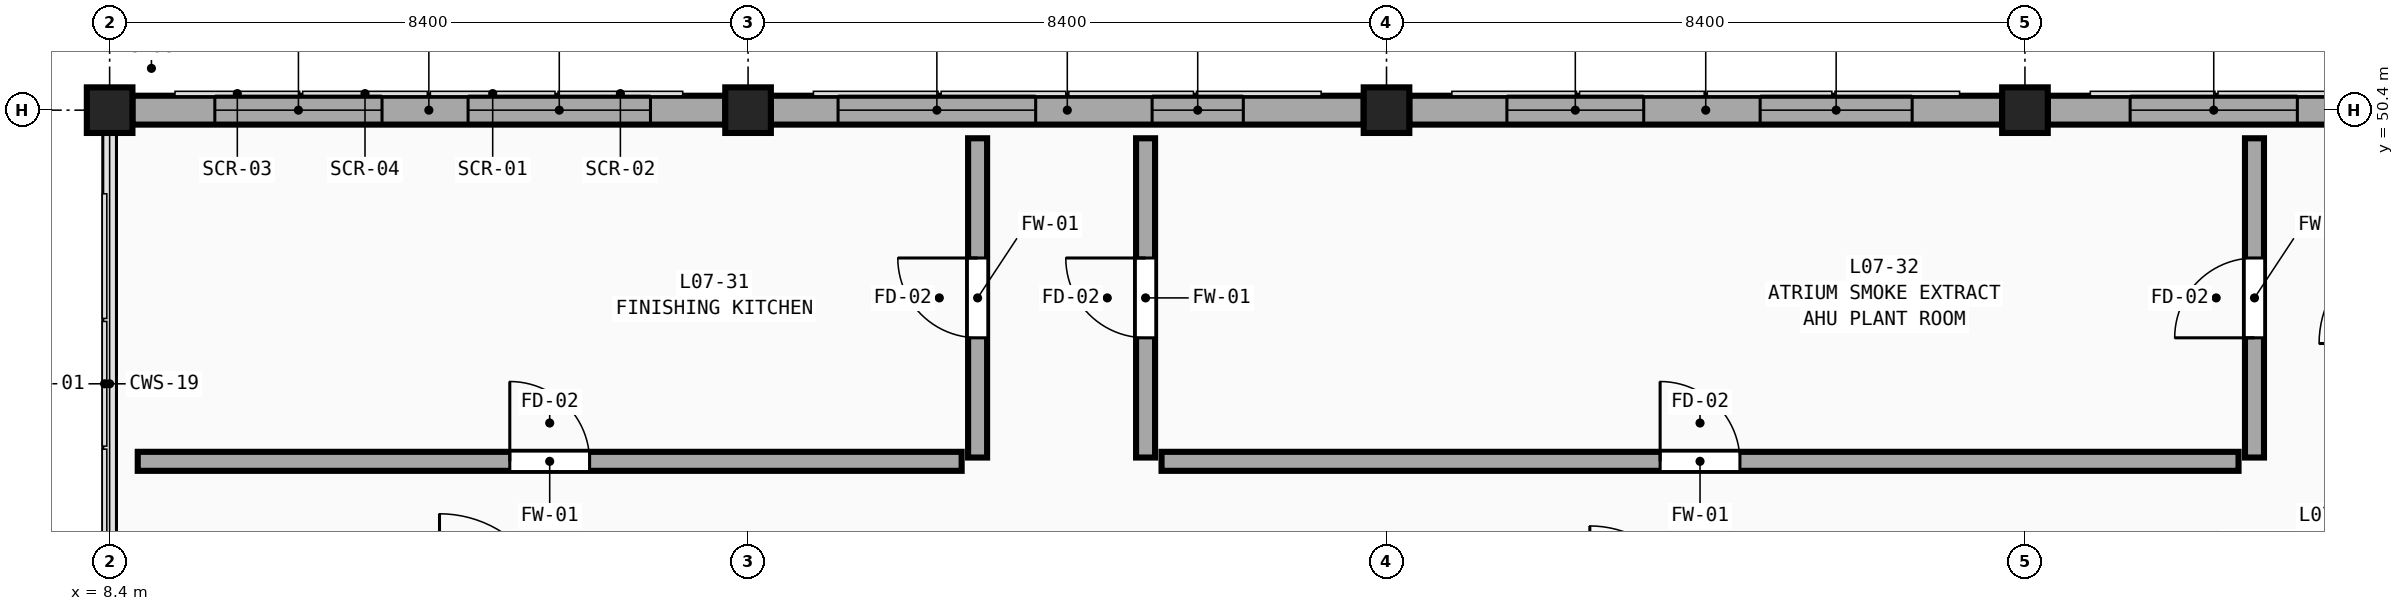
"""IFC4 building model, lengths in metres.
Left out: names, types, materials, properties, quantities, classifications, styles, units other than length and angle.
Written with IfcOpenShell. Run it as: python <this file> out.ifc"""

import sys

from ifc_helpers import new_model, si_unit, direction, frame, frame_2d, origin, origin_2d, place, context, subcontext, project, spatial, rectangle, extrude, element, fill, save


model = new_model("IFC4")
c1 = context("Model", 3, precision=1e-05, world=origin(), true_north=direction((0.0, 1.0)))
c2 = subcontext(c1, "Body", "Model", "MODEL_VIEW")
j1 = project(units=[si_unit("LENGTHUNIT", "METRE"), si_unit("PLANEANGLEUNIT", "RADIAN")], contexts=[c1])
p1 = place(None, origin())
s1 = spatial("IfcSite", under=j1, at=p1, CompositionType="ELEMENT")
p2 = place(p1, origin())
s2 = spatial("IfcBuilding", under=s1, at=p2, CompositionType="ELEMENT")
p3 = place(p2, frame((0.0, 0.0, 32.1)))
s3 = spatial("IfcBuildingStorey", under=s2, at=p3, CompositionType="ELEMENT", Elevation=32.1)
for number, where, z_axis, x_axis in (
    (1, (8.4, 50.4, 0.0), (0.0, 0.0, 1.0), (1.0, 0.0, 0.0)),
    (2, (16.8, 50.4, 0.0), (0.0, 0.0, 1.0), (1.0, 0.0, 0.0)),
    (3, (25.2, 50.4, 0.0), (0.0, 0.0, 1.0), (1.0, 0.0, 0.0)),
    (4, (33.6, 50.4, 0.0), (0.0, 0.0, 1.0), (1.0, 0.0, 0.0)),
):
    element("IfcColumn", number, at=place(p3, frame(where, z_axis=z_axis, x_axis=x_axis)), inside=s3, PredefinedType="COLUMN", context=c2, shape_type="SweptSolid", body=[
        extrude(rectangle(XDim=0.6, YDim=0.6, at=origin_2d()), origin(), (0.0, 0.0, 1.0), 4.5),
    ])
p4 = place(p3, frame((8.7, 50.4, 0.0), z_axis=(0.0, 0.0, 1.0), x_axis=(1.0, 0.0, 0.0)))
e5 = element("IfcWall", 5, at=p4, inside=s3, PredefinedType="SOLIDWALL", context=c2, shape_type="SweptSolid", body=[
    extrude(rectangle(XDim=7.8, YDim=0.38, at=frame_2d((3.9, 0.0))), origin(), (0.0, 0.0, 1.0), 3.69),
])
p5 = place(p4, frame((1.084, 0.0, 0.75)))
e6 = element("IfcOpeningElement", 6, at=p5, cuts=e5, PredefinedType="OPENING", context=c2, shape_type="SweptSolid", body=[
    extrude(rectangle(XDim=2.2, YDim=1.9, at=frame_2d((1.1, 0.95))), frame((0.0, 0.21, 0.0), z_axis=(0.0, -1.0, 0.0), x_axis=(1.0, 0.0, 0.0)), (0.0, 0.0, 1.0), 0.42),
])
p6 = place(p4, frame((4.416, 0.0, 0.75)))
e7 = element("IfcOpeningElement", 7, at=p6, cuts=e5, PredefinedType="OPENING", context=c2, shape_type="SweptSolid", body=[
    extrude(rectangle(XDim=2.4, YDim=1.9, at=frame_2d((1.2, 0.95))), frame((0.0, 0.21, 0.0), z_axis=(0.0, -1.0, 0.0), x_axis=(1.0, 0.0, 0.0)), (0.0, 0.0, 1.0), 0.42),
])
p7 = place(p3, frame((17.1, 50.4, 0.0), z_axis=(0.0, 0.0, 1.0), x_axis=(1.0, 0.0, 0.0)))
e8 = element("IfcWall", 8, at=p7, inside=s3, PredefinedType="SOLIDWALL", context=c2, shape_type="SweptSolid", body=[
    extrude(rectangle(XDim=7.8, YDim=0.38, at=frame_2d((3.9, 0.0))), origin(), (0.0, 0.0, 1.0), 3.69),
])
p8 = place(p7, frame((0.884, 0.0, 0.75)))
e9 = element("IfcOpeningElement", 9, at=p8, cuts=e8, PredefinedType="OPENING", context=c2, shape_type="SweptSolid", body=[
    extrude(rectangle(XDim=2.6, YDim=1.9, at=frame_2d((1.3, 0.95))), frame((0.0, 0.21, 0.0), z_axis=(0.0, -1.0, 0.0), x_axis=(1.0, 0.0, 0.0)), (0.0, 0.0, 1.0), 0.42),
])
p9 = place(p7, frame((5.016, 0.0, 0.75)))
e10 = element("IfcOpeningElement", 10, at=p9, cuts=e8, PredefinedType="OPENING", context=c2, shape_type="SweptSolid", body=[
    extrude(rectangle(XDim=1.2, YDim=2.08, at=frame_2d((0.6, 1.04))), frame((0.0, 0.21, 0.0), z_axis=(0.0, -1.0, 0.0), x_axis=(1.0, 0.0, 0.0)), (0.0, 0.0, 1.0), 0.42),
])
p10 = place(p3, frame((25.5, 50.4, 0.0), z_axis=(0.0, 0.0, 1.0), x_axis=(1.0, 0.0, 0.0)))
e11 = element("IfcWall", 11, at=p10, inside=s3, PredefinedType="SOLIDWALL", context=c2, shape_type="SweptSolid", body=[
    extrude(rectangle(XDim=7.8, YDim=0.38, at=frame_2d((3.9, 0.0))), origin(), (0.0, 0.0, 1.0), 3.69),
])
p11 = place(p10, frame((1.284, 0.0, 0.75)))
e12 = element("IfcOpeningElement", 12, at=p11, cuts=e11, PredefinedType="OPENING", context=c2, shape_type="SweptSolid", body=[
    extrude(rectangle(XDim=1.8, YDim=2.08, at=frame_2d((0.9, 1.04))), frame((0.0, 0.21, 0.0), z_axis=(0.0, -1.0, 0.0), x_axis=(1.0, 0.0, 0.0)), (0.0, 0.0, 1.0), 0.42),
])
p12 = place(p10, frame((4.616, 0.0, 0.75)))
e13 = element("IfcOpeningElement", 13, at=p12, cuts=e11, PredefinedType="OPENING", context=c2, shape_type="SweptSolid", body=[
    extrude(rectangle(XDim=2.0, YDim=2.08, at=frame_2d((1.0, 1.04))), frame((0.0, 0.21, 0.0), z_axis=(0.0, -1.0, 0.0), x_axis=(1.0, 0.0, 0.0)), (0.0, 0.0, 1.0), 0.42),
])
p13 = place(p3, frame((33.9, 50.4, 0.0), z_axis=(0.0, 0.0, 1.0), x_axis=(1.0, 0.0, 0.0)))
e14 = element("IfcWall", 14, at=p13, inside=s3, PredefinedType="SOLIDWALL", context=c2, shape_type="SweptSolid", body=[
    extrude(rectangle(XDim=7.8, YDim=0.38, at=frame_2d((3.9, 0.0))), origin(), (0.0, 0.0, 1.0), 3.69),
])
p14 = place(p13, frame((1.084, 0.0, 0.75)))
e15 = element("IfcOpeningElement", 15, at=p14, cuts=e14, PredefinedType="OPENING", context=c2, shape_type="SweptSolid", body=[
    extrude(rectangle(XDim=2.2, YDim=2.08, at=frame_2d((1.1, 1.04))), frame((0.0, 0.21, 0.0), z_axis=(0.0, -1.0, 0.0), x_axis=(1.0, 0.0, 0.0)), (0.0, 0.0, 1.0), 0.42),
])
p15 = place(p13, frame((4.416, 0.0, 0.75)))
e16 = element("IfcOpeningElement", 16, at=p15, cuts=e14, PredefinedType="OPENING", context=c2, shape_type="SweptSolid", body=[
    extrude(rectangle(XDim=2.4, YDim=2.08, at=frame_2d((1.2, 1.04))), frame((0.0, 0.21, 0.0), z_axis=(0.0, -1.0, 0.0), x_axis=(1.0, 0.0, 0.0)), (0.0, 0.0, 1.0), 0.42),
])
p16 = place(p3, frame((22.24, 45.78, 0.0), z_axis=(0.0, 0.0, 1.0), x_axis=(1.0, 0.0, 0.0)))
e17 = element("IfcWall", 17, at=p16, inside=s3, PredefinedType="SOLIDWALL", context=c2, shape_type="SweptSolid", body=[
    extrude(rectangle(XDim=14.17, YDim=0.25, at=frame_2d((7.085, 0.0))), origin(), (0.0, 0.0, 1.0), 4.24),
])
p17 = place(p16, frame((6.56, 0.0, 0.0)))
e18 = element("IfcOpeningElement", 18, at=p17, cuts=e17, PredefinedType="OPENING", context=c2, shape_type="SweptSolid", body=[
    extrude(rectangle(XDim=1.05, YDim=2.15, at=frame_2d((0.525, 1.075))), frame((0.0, 0.145, 0.0), z_axis=(0.0, -1.0, 0.0), x_axis=(1.0, 0.0, 0.0)), (0.0, 0.0, 1.0), 0.29),
])
p18 = place(p3, frame((8.77, 45.78, 0.0), z_axis=(0.0, 0.0, 1.0), x_axis=(1.0, 0.0, 0.0)))
e19 = element("IfcWall", 19, at=p18, inside=s3, PredefinedType="SOLIDWALL", context=c2, shape_type="SweptSolid", body=[
    extrude(rectangle(XDim=10.84, YDim=0.25, at=frame_2d((5.42, 0.0))), origin(), (0.0, 0.0, 1.0), 4.24),
])
p19 = place(p18, frame((4.895, 0.0, 0.0)))
e20 = element("IfcOpeningElement", 20, at=p19, cuts=e19, PredefinedType="OPENING", context=c2, shape_type="SweptSolid", body=[
    extrude(rectangle(XDim=1.05, YDim=2.15, at=frame_2d((0.525, 1.075))), frame((0.0, 0.145, 0.0), z_axis=(0.0, -1.0, 0.0), x_axis=(1.0, 0.0, 0.0)), (0.0, 0.0, 1.0), 0.29),
])
p20 = place(p3, frame((19.82, 45.83, 0.0), z_axis=(0.0, 0.0, 1.0), x_axis=(0.0, 1.0, 0.0)))
e21 = element("IfcWall", 21, at=p20, inside=s3, PredefinedType="SOLIDWALL", context=c2, shape_type="SweptSolid", body=[
    extrude(rectangle(XDim=4.2, YDim=0.25, at=frame_2d((2.1, 0.0))), origin(), (0.0, 0.0, 1.0), 4.24),
])
p21 = place(p20, frame((1.575, 0.0, 0.0)))
e22 = element("IfcOpeningElement", 22, at=p21, cuts=e21, PredefinedType="OPENING", context=c2, shape_type="SweptSolid", body=[
    extrude(rectangle(XDim=1.05, YDim=2.15, at=frame_2d((0.525, 1.075))), frame((0.0, 0.145, 0.0), z_axis=(0.0, -1.0, 0.0), x_axis=(1.0, 0.0, 0.0)), (0.0, 0.0, 1.0), 0.29),
])
p22 = place(p3, frame((36.62, 45.83, 0.0), z_axis=(0.0, 0.0, 1.0), x_axis=(0.0, 1.0, 0.0)))
e23 = element("IfcWall", 23, at=p22, inside=s3, PredefinedType="SOLIDWALL", context=c2, shape_type="SweptSolid", body=[
    extrude(rectangle(XDim=4.2, YDim=0.25, at=frame_2d((2.1, 0.0))), origin(), (0.0, 0.0, 1.0), 4.24),
])
p23 = place(p22, frame((1.575, 0.0, 0.0)))
e24 = element("IfcOpeningElement", 24, at=p23, cuts=e23, PredefinedType="OPENING", context=c2, shape_type="SweptSolid", body=[
    extrude(rectangle(XDim=1.05, YDim=2.15, at=frame_2d((0.525, 1.075))), frame((0.0, 0.145, 0.0), z_axis=(0.0, -1.0, 0.0), x_axis=(1.0, 0.0, 0.0)), (0.0, 0.0, 1.0), 0.29),
])
p24 = place(p3, frame((22.03, 45.83, 0.0), z_axis=(0.0, 0.0, 1.0), x_axis=(0.0, 1.0, 0.0)))
e25 = element("IfcWall", 25, at=p24, inside=s3, PredefinedType="SOLIDWALL", context=c2, shape_type="SweptSolid", body=[
    extrude(rectangle(XDim=4.2, YDim=0.25, at=frame_2d((2.1, 0.0))), origin(), (0.0, 0.0, 1.0), 4.24),
])
p25 = place(p24, frame((1.575, 0.0, 0.0)))
e26 = element("IfcOpeningElement", 26, at=p25, cuts=e25, PredefinedType="OPENING", context=c2, shape_type="SweptSolid", body=[
    extrude(rectangle(XDim=1.05, YDim=2.15, at=frame_2d((0.525, 1.075))), frame((0.0, 0.145, 0.0), z_axis=(0.0, -1.0, 0.0), x_axis=(1.0, 0.0, 0.0)), (0.0, 0.0, 1.0), 0.29),
])
p26 = place(p5, origin())
e27 = element("IfcWindow", 27, at=p26, inside=s3, PartitioningType="TRIPLE_PANEL_VERTICAL", PredefinedType="WINDOW", context=c2, shape_type="SweptSolid", body=[
    extrude(rectangle(XDim=2.2, YDim=1.9, at=frame_2d((1.1, 0.95))), frame((0.0, 0.03, 0.0), z_axis=(0.0, -1.0, 0.0), x_axis=(1.0, 0.0, 0.0)), (0.0, 0.0, 1.0), 0.06),
])
fill(e6, e27)
p27 = place(p6, origin())
e28 = element("IfcWindow", 28, at=p27, inside=s3, PartitioningType="TRIPLE_PANEL_VERTICAL", PredefinedType="WINDOW", context=c2, shape_type="SweptSolid", body=[
    extrude(rectangle(XDim=2.4, YDim=1.9, at=frame_2d((1.2, 0.95))), frame((0.0, 0.03, 0.0), z_axis=(0.0, -1.0, 0.0), x_axis=(1.0, 0.0, 0.0)), (0.0, 0.0, 1.0), 0.06),
])
fill(e7, e28)
p28 = place(p8, origin())
e29 = element("IfcWindow", 29, at=p28, inside=s3, PartitioningType="TRIPLE_PANEL_VERTICAL", PredefinedType="WINDOW", context=c2, shape_type="SweptSolid", body=[
    extrude(rectangle(XDim=2.6, YDim=1.9, at=frame_2d((1.3, 0.95))), frame((0.0, 0.03, 0.0), z_axis=(0.0, -1.0, 0.0), x_axis=(1.0, 0.0, 0.0)), (0.0, 0.0, 1.0), 0.06),
])
fill(e9, e29)
p29 = place(p9, origin())
e30 = element("IfcWindow", 30, at=p29, inside=s3, PartitioningType="SINGLE_PANEL", PredefinedType="WINDOW", context=c2, shape_type="SweptSolid", body=[
    extrude(rectangle(XDim=1.2, YDim=2.08, at=frame_2d((0.6, 1.04))), frame((0.0, 0.03, 0.0), z_axis=(0.0, -1.0, 0.0), x_axis=(1.0, 0.0, 0.0)), (0.0, 0.0, 1.0), 0.06),
])
fill(e10, e30)
p30 = place(p11, origin())
e31 = element("IfcWindow", 31, at=p30, inside=s3, PartitioningType="DOUBLE_PANEL_VERTICAL", PredefinedType="WINDOW", context=c2, shape_type="SweptSolid", body=[
    extrude(rectangle(XDim=1.8, YDim=2.08, at=frame_2d((0.9, 1.04))), frame((0.0, 0.03, 0.0), z_axis=(0.0, -1.0, 0.0), x_axis=(1.0, 0.0, 0.0)), (0.0, 0.0, 1.0), 0.06),
])
fill(e12, e31)
p31 = place(p12, origin())
e32 = element("IfcWindow", 32, at=p31, inside=s3, PartitioningType="TRIPLE_PANEL_VERTICAL", PredefinedType="WINDOW", context=c2, shape_type="SweptSolid", body=[
    extrude(rectangle(XDim=2.0, YDim=2.08, at=frame_2d((1.0, 1.04))), frame((0.0, 0.03, 0.0), z_axis=(0.0, -1.0, 0.0), x_axis=(1.0, 0.0, 0.0)), (0.0, 0.0, 1.0), 0.06),
])
fill(e13, e32)
p32 = place(p14, origin())
e33 = element("IfcWindow", 33, at=p32, inside=s3, PartitioningType="TRIPLE_PANEL_VERTICAL", PredefinedType="WINDOW", context=c2, shape_type="SweptSolid", body=[
    extrude(rectangle(XDim=2.2, YDim=2.08, at=frame_2d((1.1, 1.04))), frame((0.0, 0.03, 0.0), z_axis=(0.0, -1.0, 0.0), x_axis=(1.0, 0.0, 0.0)), (0.0, 0.0, 1.0), 0.06),
])
fill(e15, e33)
p33 = place(p17, origin())
e34 = element("IfcDoor", 34, at=p33, inside=s3, OperationType="SINGLE_SWING_LEFT", PredefinedType="DOOR", context=c2, shape_type="SweptSolid", body=[
    extrude(rectangle(XDim=1.05, YDim=2.15, at=frame_2d((0.525, 1.075))), frame((0.0, 0.025, 0.0), z_axis=(0.0, -1.0, 0.0), x_axis=(1.0, 0.0, 0.0)), (0.0, 0.0, 1.0), 0.05),
])
fill(e18, e34)
p34 = place(p19, origin())
e35 = element("IfcDoor", 35, at=p34, inside=s3, OperationType="SINGLE_SWING_LEFT", PredefinedType="DOOR", context=c2, shape_type="SweptSolid", body=[
    extrude(rectangle(XDim=1.05, YDim=2.15, at=frame_2d((0.525, 1.075))), frame((0.0, 0.025, 0.0), z_axis=(0.0, -1.0, 0.0), x_axis=(1.0, 0.0, 0.0)), (0.0, 0.0, 1.0), 0.05),
])
fill(e20, e35)
p35 = place(p21, origin())
e36 = element("IfcDoor", 36, at=p35, inside=s3, OperationType="SINGLE_SWING_RIGHT", PredefinedType="DOOR", context=c2, shape_type="SweptSolid", body=[
    extrude(rectangle(XDim=1.05, YDim=2.15, at=frame_2d((0.525, 1.075))), frame((0.0, 0.025, 0.0), z_axis=(0.0, -1.0, 0.0), x_axis=(1.0, 0.0, 0.0)), (0.0, 0.0, 1.0), 0.05),
])
fill(e22, e36)
p36 = place(p23, origin())
e37 = element("IfcDoor", 37, at=p36, inside=s3, OperationType="SINGLE_SWING_LEFT", PredefinedType="DOOR", context=c2, shape_type="SweptSolid", body=[
    extrude(rectangle(XDim=1.05, YDim=2.15, at=frame_2d((0.525, 1.075))), frame((0.0, 0.025, 0.0), z_axis=(0.0, -1.0, 0.0), x_axis=(1.0, 0.0, 0.0)), (0.0, 0.0, 1.0), 0.05),
])
fill(e24, e37)
p37 = place(p25, origin())
e38 = element("IfcDoor", 38, at=p37, inside=s3, OperationType="SINGLE_SWING_RIGHT", PredefinedType="DOOR", context=c2, shape_type="SweptSolid", body=[
    extrude(rectangle(XDim=1.05, YDim=2.15, at=frame_2d((0.525, 1.075))), frame((0.0, 0.025, 0.0), z_axis=(0.0, -1.0, 0.0), x_axis=(1.0, 0.0, 0.0)), (0.0, 0.0, 1.0), 0.05),
])
fill(e26, e38)
save(model, sys.argv[1])
